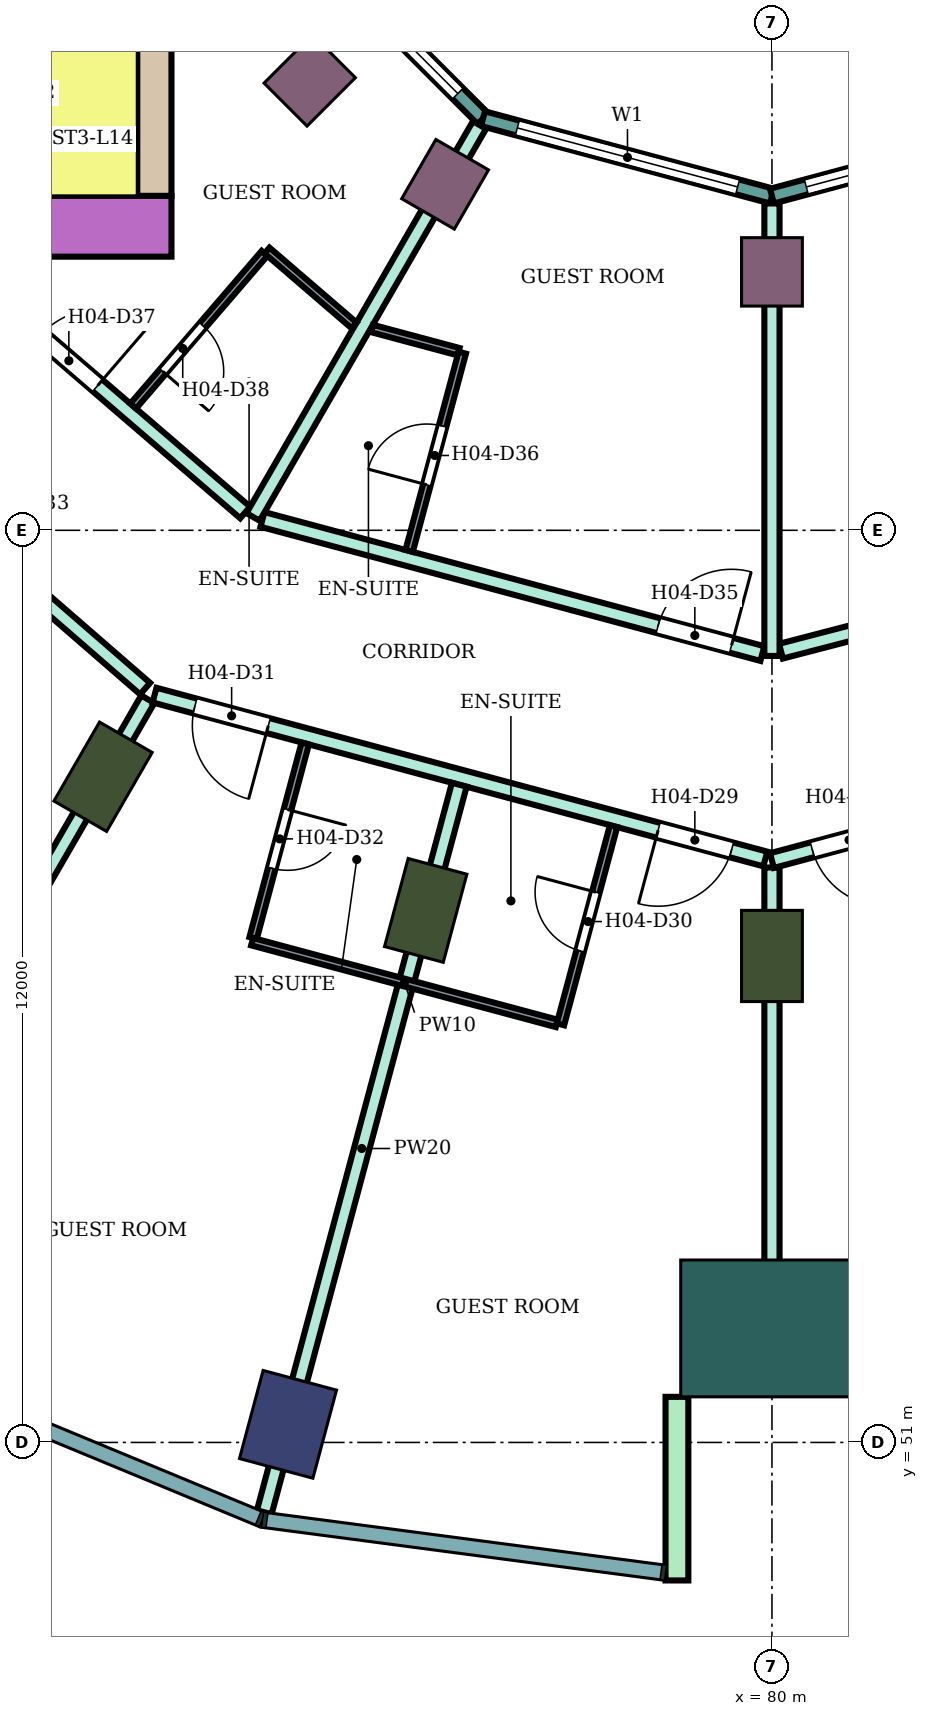
"""IFC4 building model, lengths in metres.
Left out: names, types, materials, properties, quantities, classifications, styles, units other than length and angle.
Written with IfcOpenShell. Run it as: python <this file> out.ifc"""

import sys

from ifc_helpers import new_model, si_unit, direction, frame, frame_2d, origin, origin_2d, place, context, subcontext, project, spatial, rectangle, extrude, element, fill, save


model = new_model("IFC4")
c1 = context("Model", 3, precision=1e-05, world=origin(), true_north=direction((0.0, 1.0)))
c2 = subcontext(c1, "Body", "Model", "MODEL_VIEW")
j1 = project(units=[si_unit("LENGTHUNIT", "METRE"), si_unit("PLANEANGLEUNIT", "RADIAN")], contexts=[c1])
p1 = place(None, origin())
s1 = spatial("IfcSite", under=j1, at=p1, CompositionType="ELEMENT")
p2 = place(p1, origin())
s2 = spatial("IfcBuilding", under=s1, at=p2, CompositionType="ELEMENT")
p3 = place(p2, frame((0.0, 0.0, 63.0)))
s3 = spatial("IfcBuildingStorey", under=s2, at=p3, CompositionType="ELEMENT", Elevation=63.0)
p4 = place(p3, frame((73.633, 51.238, 0.0), z_axis=(0.0, 0.0, 1.0), x_axis=(-0.258819045103, -0.965925826289, 0.0)))
e1 = element("IfcColumn", 1, at=p4, inside=s3, PredefinedType="COLUMN", context=c2, shape_type="SweptSolid", body=[
    extrude(rectangle(XDim=1.2, YDim=1.0, at=origin_2d()), origin(), (0.0, 0.0, 1.0), 3.8),
])
for number, where, z_axis, x_axis in (
    (2, (71.2, 59.758, 0.0), (0.0, 0.0, 1.0), (-0.5, -0.866, 0.0)),
    (3, (75.445, 58.0, 0.0), (0.0, 0.0, 1.0), (-0.259, -0.966, 0.0)),
    (4, (80.0, 57.4, 0.0), (0.0, 0.0, 1.0), (0.0, -1.0, 0.0)),
):
    element("IfcColumn", number, at=place(p3, frame(where, z_axis=z_axis, x_axis=x_axis)), inside=s3, PredefinedType="COLUMN", context=c2, shape_type="SweptSolid", body=[
        extrude(rectangle(XDim=1.2, YDim=0.8, at=origin_2d()), origin(), (0.0, 0.0, 1.0), 3.8),
    ])
for number, where, z_axis, x_axis in (
    (5, (73.919, 68.919, 0.0), (0.0, 0.0, 1.0), (-0.707, -0.707, 0.0)),
    (6, (75.7, 67.552, 0.0), (0.0, 0.0, 1.0), (-0.5, -0.866, 0.0)),
    (7, (80.0, 66.4, 0.0), (0.0, 0.0, 1.0), (0.0, -1.0, 0.0)),
):
    element("IfcColumn", number, at=place(p3, frame(where, z_axis=z_axis, x_axis=x_axis)), inside=s3, PredefinedType="COLUMN", context=c2, shape_type="SweptSolid", body=[
        extrude(rectangle(XDim=0.9, YDim=0.8, at=origin_2d()), origin(), (0.0, 0.0, 1.0), 3.8),
    ])
p5 = place(p3, frame((80.0, 52.5, 0.0), z_axis=(0.0, 0.0, 1.0), x_axis=(0.0, -1.0, 0.0)))
e8 = element("IfcColumn", 8, at=p5, inside=s3, PredefinedType="COLUMN", context=c2, shape_type="SweptSolid", body=[
    extrude(rectangle(XDim=1.8, YDim=2.4, at=origin_2d()), origin(), (0.0, 0.0, 1.0), 3.8),
])
p6 = place(p3, frame((72.1, 67.0, 0.0), z_axis=(0.0, 0.0, 1.0), x_axis=(-1.0, 0.0, 0.0)))
e9 = element("IfcWall", 9, at=p6, inside=s3, PredefinedType="SHEAR", context=c2, shape_type="SweptSolid", body=[
    extrude(rectangle(XDim=14.7, YDim=0.8, at=frame_2d((7.35, 0.0))), origin(), (0.0, 0.0, 1.0), 3.48),
])
p7 = place(p6, frame((4.2, 0.0, 0.0)))
e10 = element("IfcOpeningElement", 10, at=p7, cuts=e9, PredefinedType="OPENING", context=c2, shape_type="SweptSolid", body=[
    extrude(rectangle(XDim=2.4, YDim=2.4, at=frame_2d((1.2, 1.2))), frame((0.0, 0.41, 0.0), z_axis=(0.0, -1.0, 0.0), x_axis=(1.0, 0.0, 0.0)), (0.0, 0.0, 1.0), 0.82),
])
p8 = place(p3, frame((71.875, 75.0, 0.0), z_axis=(0.0, 0.0, 1.0), x_axis=(0.0, -1.0, 0.0)))
e11 = element("IfcWall", 11, at=p8, inside=s3, PredefinedType="SHEAR", context=c2, shape_type="SweptSolid", body=[
    extrude(rectangle(XDim=7.6, YDim=0.45, at=frame_2d((3.8, 0.0))), origin(), (0.0, 0.0, 1.0), 3.48),
])
p9 = place(p3, frame((78.75, 51.6, 0.0), z_axis=(0.0, 0.0, 1.0), x_axis=(0.0, -1.0, 0.0)))
e12 = element("IfcWall", 12, at=p9, inside=s3, PredefinedType="NOTDEFINED", context=c2, shape_type="SweptSolid", body=[
    extrude(rectangle(XDim=2.416, YDim=0.3, at=frame_2d((1.208, 0.0))), origin(), (0.0, 0.0, 1.0), 3.8),
])
p10 = place(p3, frame((73.415, 71.198, 0.0), z_axis=(0.0, 0.0, 1.0), x_axis=(0.707106781187, -0.707106781187, 0.0)))
e13 = element("IfcWall", 13, at=p10, inside=s3, PredefinedType="NOTDEFINED", context=c2, shape_type="SweptSolid", body=[
    extrude(rectangle(XDim=3.936, YDim=0.2, at=frame_2d((1.968, 0.0))), origin(), (0.0, 0.0, 1.0), 3.8),
])
p11 = place(p10, frame((0.468, 0.0, 0.9)))
e14 = element("IfcOpeningElement", 14, at=p11, cuts=e13, PredefinedType="OPENING", context=c2, shape_type="SweptSolid", body=[
    extrude(rectangle(XDim=3.0, YDim=2.3, at=frame_2d((1.5, 1.15))), frame((0.0, 0.11, 0.0), z_axis=(0.0, -1.0, 0.0), x_axis=(1.0, 0.0, 0.0)), (0.0, 0.0, 1.0), 0.22),
])
p12 = place(p3, frame((76.198, 68.415, 0.0), z_axis=(0.0, 0.0, 1.0), x_axis=(0.965933654434, -0.258789828301, 0.0)))
e15 = element("IfcWall", 15, at=p12, inside=s3, PredefinedType="NOTDEFINED", context=c2, shape_type="SweptSolid", body=[
    extrude(rectangle(XDim=3.936, YDim=0.2, at=frame_2d((1.968, 0.0))), origin(), (0.0, 0.0, 1.0), 3.8),
])
p13 = place(p12, frame((0.468, 0.0, 0.9)))
e16 = element("IfcOpeningElement", 16, at=p13, cuts=e15, PredefinedType="OPENING", context=c2, shape_type="SweptSolid", body=[
    extrude(rectangle(XDim=3.0, YDim=2.3, at=frame_2d((1.5, 1.15))), frame((0.0, 0.11, 0.0), z_axis=(0.0, -1.0, 0.0), x_axis=(1.0, 0.0, 0.0)), (0.0, 0.0, 1.0), 0.22),
])
p14 = place(p3, frame((80.0, 67.396, 0.0), z_axis=(0.0, 0.0, 1.0), x_axis=(0.965933654434, 0.258789828301, 0.0)))
e17 = element("IfcWall", 17, at=p14, inside=s3, PredefinedType="NOTDEFINED", context=c2, shape_type="SweptSolid", body=[
    extrude(rectangle(XDim=3.936, YDim=0.2, at=frame_2d((1.968, 0.0))), origin(), (0.0, 0.0, 1.0), 3.8),
])
p15 = place(p14, frame((0.468, 0.0, 0.9)))
e18 = element("IfcOpeningElement", 18, at=p15, cuts=e17, PredefinedType="OPENING", context=c2, shape_type="SweptSolid", body=[
    extrude(rectangle(XDim=3.0, YDim=2.3, at=frame_2d((1.5, 1.15))), frame((0.0, 0.11, 0.0), z_axis=(0.0, -1.0, 0.0), x_axis=(1.0, 0.0, 0.0)), (0.0, 0.0, 1.0), 0.22),
])
p16 = place(p3, frame((66.924, 65.111, 0.0), z_axis=(0.0, 0.0, 1.0), x_axis=(0.755023669255, -0.655697536113, 0.0)))
e19 = element("IfcWall", 19, at=p16, inside=s3, PredefinedType="PARTITIONING", context=c2, shape_type="SweptSolid", body=[
    extrude(rectangle(XDim=6.396, YDim=0.2, at=frame_2d((3.198, 0.0))), origin(), (0.0, 0.0, 1.0), 3.35),
])
p17 = place(p16, frame((2.658, 0.0, 0.0)))
e20 = element("IfcOpeningElement", 20, at=p17, cuts=e19, PredefinedType="OPENING", context=c2, shape_type="SweptSolid", body=[
    extrude(rectangle(XDim=1.8, YDim=2.1, at=frame_2d((0.9, 1.05))), frame((0.0, 0.11, 0.0), z_axis=(0.0, -1.0, 0.0), x_axis=(1.0, 0.0, 0.0)), (0.0, 0.0, 1.0), 0.22),
])
p18 = place(p3, frame((67.099, 52.661, 0.0), z_axis=(0.0, 0.0, 1.0), x_axis=(0.500234203776, 0.86589014394, 0.0)))
e21 = element("IfcWall", 21, at=p18, inside=s3, PredefinedType="PARTITIONING", context=c2, shape_type="SweptSolid", body=[
    extrude(rectangle(XDim=9.374, YDim=0.2, at=frame_2d((4.687, 0.0))), origin(), (0.0, 0.0, 1.0), 3.35),
])
p19 = place(p3, frame((69.158, 66.6, 0.0), z_axis=(0.0, 0.0, 1.0), x_axis=(0.757976058094, -0.652282373943, 0.0)))
e22 = element("IfcWall", 22, at=p19, inside=s3, PredefinedType="PARTITIONING", context=c2, shape_type="SweptSolid", body=[
    extrude(rectangle(XDim=5.16, YDim=0.2, at=frame_2d((2.58, 0.0))), origin(), (0.0, 0.0, 1.0), 3.35),
])
p20 = place(p19, frame((1.6, 0.0, 0.0)))
e23 = element("IfcOpeningElement", 23, at=p20, cuts=e22, PredefinedType="OPENING", context=c2, shape_type="SweptSolid", body=[
    extrude(rectangle(XDim=1.0, YDim=2.1, at=frame_2d((0.5, 1.05))), frame((0.0, 0.11, 0.0), z_axis=(0.0, -1.0, 0.0), x_axis=(1.0, 0.0, 0.0)), (0.0, 0.0, 1.0), 0.22),
])
p21 = place(p3, frame((71.877, 60.832, 0.0), z_axis=(0.0, 0.0, 1.0), x_axis=(0.965852509869, -0.259092510851, 0.0)))
e24 = element("IfcWall", 24, at=p21, inside=s3, PredefinedType="PARTITIONING", context=c2, shape_type="SweptSolid", body=[
    extrude(rectangle(XDim=8.32, YDim=0.2, at=frame_2d((4.16, 0.0))), origin(), (0.0, 0.0, 1.0), 3.35),
])
p22 = place(p21, frame((6.86, 0.0, 0.0)))
e25 = element("IfcOpeningElement", 25, at=p22, cuts=e24, PredefinedType="OPENING", context=c2, shape_type="SweptSolid", body=[
    extrude(rectangle(XDim=1.0, YDim=2.1, at=frame_2d((0.5, 1.05))), frame((0.0, 0.11, 0.0), z_axis=(0.0, -1.0, 0.0), x_axis=(1.0, 0.0, 0.0)), (0.0, 0.0, 1.0), 0.22),
])
p23 = place(p21, frame((0.55, 0.0, 0.0)))
e26 = element("IfcOpeningElement", 26, at=p23, cuts=e24, PredefinedType="OPENING", context=c2, shape_type="SweptSolid", body=[
    extrude(rectangle(XDim=1.0, YDim=2.1, at=frame_2d((0.5, 1.05))), frame((0.0, 0.11, 0.0), z_axis=(0.0, -1.0, 0.0), x_axis=(1.0, 0.0, 0.0)), (0.0, 0.0, 1.0), 0.22),
])
p24 = place(p3, frame((73.297, 63.143, 0.0), z_axis=(0.0, 0.0, 1.0), x_axis=(0.965859030528, -0.25906820173, 0.0)))
e27 = element("IfcWall", 27, at=p24, inside=s3, PredefinedType="PARTITIONING", context=c2, shape_type="SweptSolid", body=[
    extrude(rectangle(XDim=6.81, YDim=0.2, at=frame_2d((3.405, 0.0))), origin(), (0.0, 0.0, 1.0), 3.35),
])
p25 = place(p24, frame((5.39, 0.0, 0.0)))
e28 = element("IfcOpeningElement", 28, at=p25, cuts=e27, PredefinedType="OPENING", context=c2, shape_type="SweptSolid", body=[
    extrude(rectangle(XDim=1.0, YDim=2.1, at=frame_2d((0.5, 1.05))), frame((0.0, 0.11, 0.0), z_axis=(0.0, -1.0, 0.0), x_axis=(1.0, 0.0, 0.0)), (0.0, 0.0, 1.0), 0.22),
])
p26 = place(p3, frame((73.174, 63.176, 0.0), z_axis=(0.0, 0.0, 1.0), x_axis=(0.500257106344, 0.865876912472, 0.0)))
e29 = element("IfcWall", 29, at=p26, inside=s3, PredefinedType="PARTITIONING", context=c2, shape_type="SweptSolid", body=[
    extrude(rectangle(XDim=5.955, YDim=0.2, at=frame_2d((2.978, 0.0))), origin(), (0.0, 0.0, 1.0), 3.35),
])
p27 = place(p3, frame((73.321, 50.081, 0.0), z_axis=(0.0, 0.0, 1.0), x_axis=(0.258889198551, 0.965907025999, 0.0)))
e30 = element("IfcWall", 30, at=p27, inside=s3, PredefinedType="PARTITIONING", context=c2, shape_type="SweptSolid", body=[
    extrude(rectangle(XDim=9.909, YDim=0.2, at=frame_2d((4.955, 0.0))), origin(), (0.0, 0.0, 1.0), 3.35),
])
p28 = place(p3, frame((80.119, 61.41, 0.0), z_axis=(0.0, 0.0, 1.0), x_axis=(0.967823361235, 0.251630565408, 0.0)))
e31 = element("IfcWall", 31, at=p28, inside=s3, PredefinedType="PARTITIONING", context=c2, shape_type="SweptSolid", body=[
    extrude(rectangle(XDim=6.958, YDim=0.2, at=frame_2d((3.479, 0.0))), origin(), (0.0, 0.0, 1.0), 3.35),
])
p29 = place(p28, frame((2.529, 0.0, 0.0)))
e32 = element("IfcOpeningElement", 32, at=p29, cuts=e31, PredefinedType="OPENING", context=c2, shape_type="SweptSolid", body=[
    extrude(rectangle(XDim=1.8, YDim=2.1, at=frame_2d((0.9, 1.05))), frame((0.0, 0.11, 0.0), z_axis=(0.0, -1.0, 0.0), x_axis=(1.0, 0.0, 0.0)), (0.0, 0.0, 1.0), 0.22),
])
p30 = place(p3, frame((80.0, 51.8, 0.0), z_axis=(0.0, 0.0, 1.0), x_axis=(0.0, 1.0, 0.0)))
e33 = element("IfcWall", 33, at=p30, inside=s3, PredefinedType="PARTITIONING", context=c2, shape_type="SweptSolid", body=[
    extrude(rectangle(XDim=6.764, YDim=0.2, at=frame_2d((3.382, 0.0))), origin(), (0.0, 0.0, 1.0), 3.35),
])
p31 = place(p3, frame((80.0, 58.655, 0.0), z_axis=(0.0, 0.0, 1.0), x_axis=(0.965974635626, 0.258636817424, 0.0)))
e34 = element("IfcWall", 34, at=p31, inside=s3, PredefinedType="PARTITIONING", context=c2, shape_type="SweptSolid", body=[
    extrude(rectangle(XDim=8.36, YDim=0.2, at=frame_2d((4.18, 0.0))), origin(), (0.0, 0.0, 1.0), 3.35),
])
p32 = place(p31, frame((6.86, 0.0, 0.0)))
e35 = element("IfcOpeningElement", 35, at=p32, cuts=e34, PredefinedType="OPENING", context=c2, shape_type="SweptSolid", body=[
    extrude(rectangle(XDim=1.0, YDim=2.1, at=frame_2d((0.5, 1.05))), frame((0.0, 0.11, 0.0), z_axis=(0.0, -1.0, 0.0), x_axis=(1.0, 0.0, 0.0)), (0.0, 0.0, 1.0), 0.22),
])
p33 = place(p31, frame((0.55, 0.0, 0.0)))
e36 = element("IfcOpeningElement", 36, at=p33, cuts=e34, PredefinedType="OPENING", context=c2, shape_type="SweptSolid", body=[
    extrude(rectangle(XDim=1.0, YDim=2.1, at=frame_2d((0.5, 1.05))), frame((0.0, 0.11, 0.0), z_axis=(0.0, -1.0, 0.0), x_axis=(1.0, 0.0, 0.0)), (0.0, 0.0, 1.0), 0.22),
])
p34 = place(p3, frame((80.0, 61.347, 0.0), z_axis=(0.0, 0.0, 1.0), x_axis=(0.0, 1.0, 0.0)))
e37 = element("IfcWall", 37, at=p34, inside=s3, PredefinedType="PARTITIONING", context=c2, shape_type="SweptSolid", body=[
    extrude(rectangle(XDim=5.953, YDim=0.2, at=frame_2d((2.977, 0.0))), origin(), (0.0, 0.0, 1.0), 3.35),
])
p35 = place(p3, frame((71.596, 64.635, 0.0), z_axis=(0.0, 0.0, 1.0), x_axis=(0.652285007511, 0.757973791748, 0.0)))
e38 = element("IfcWall", 38, at=p35, inside=s3, PredefinedType="PARTITIONING", context=c2, shape_type="SweptSolid", body=[
    extrude(rectangle(XDim=2.65, YDim=0.1, at=frame_2d((1.325, 0.0))), origin(), (0.0, 0.0, 1.0), 3.35),
])
p36 = place(p35, frame((0.6, 0.0, 0.0)))
e39 = element("IfcOpeningElement", 39, at=p36, cuts=e38, PredefinedType="OPENING", context=c2, shape_type="SweptSolid", body=[
    extrude(rectangle(XDim=0.8, YDim=2.1, at=frame_2d((0.4, 1.05))), frame((0.0, 0.06, 0.0), z_axis=(0.0, -1.0, 0.0), x_axis=(1.0, 0.0, 0.0)), (0.0, 0.0, 1.0), 0.12),
])
p37 = place(p3, frame((73.174, 57.636, 0.0), z_axis=(0.0, 0.0, 1.0), x_axis=(0.258952498977, 0.96589005755, 0.0)))
e40 = element("IfcWall", 40, at=p37, inside=s3, PredefinedType="PARTITIONING", context=c2, shape_type="SweptSolid", body=[
    extrude(rectangle(XDim=2.65, YDim=0.1, at=frame_2d((1.325, 0.0))), origin(), (0.0, 0.0, 1.0), 3.35),
])
p38 = place(p37, frame((0.95, 0.0, 0.0)))
e41 = element("IfcOpeningElement", 41, at=p38, cuts=e40, PredefinedType="OPENING", context=c2, shape_type="SweptSolid", body=[
    extrude(rectangle(XDim=0.8, YDim=2.1, at=frame_2d((0.4, 1.05))), frame((0.0, 0.06, 0.0), z_axis=(0.0, -1.0, 0.0), x_axis=(1.0, 0.0, 0.0)), (0.0, 0.0, 1.0), 0.12),
])
p39 = place(p3, frame((73.161, 57.588, 0.0), z_axis=(0.0, 0.0, 1.0), x_axis=(0.965858994467, -0.259068336173, 0.0)))
e42 = element("IfcWall", 42, at=p39, inside=s3, PredefinedType="PARTITIONING", context=c2, shape_type="SweptSolid", body=[
    extrude(rectangle(XDim=4.15, YDim=0.1, at=frame_2d((2.075, 0.0))), origin(), (0.0, 0.0, 1.0), 3.35),
])
p40 = place(p3, frame((73.357, 66.681, 0.0), z_axis=(0.0, 0.0, 1.0), x_axis=(0.758263469747, -0.651948242154, 0.0)))
e43 = element("IfcWall", 43, at=p40, inside=s3, PredefinedType="PARTITIONING", context=c2, shape_type="SweptSolid", body=[
    extrude(rectangle(XDim=1.511, YDim=0.1, at=frame_2d((0.755, 0.0))), origin(), (0.0, 0.0, 1.0), 3.35),
])
p41 = place(p3, frame((74.739, 65.655, 0.0), z_axis=(0.0, 0.0, 1.0), x_axis=(0.96591107063, -0.258874107695, 0.0)))
e44 = element("IfcWall", 44, at=p41, inside=s3, PredefinedType="PARTITIONING", context=c2, shape_type="SweptSolid", body=[
    extrude(rectangle(XDim=1.179, YDim=0.1, at=frame_2d((0.589, 0.0))), origin(), (0.0, 0.0, 1.0), 3.35),
])
p42 = place(p3, frame((75.227, 62.729, 0.0), z_axis=(0.0, 0.0, 1.0), x_axis=(0.258945475746, 0.965891940432, 0.0)))
e45 = element("IfcWall", 45, at=p42, inside=s3, PredefinedType="PARTITIONING", context=c2, shape_type="SweptSolid", body=[
    extrude(rectangle(XDim=2.7, YDim=0.1, at=frame_2d((1.35, 0.0))), origin(), (0.0, 0.0, 1.0), 3.35),
])
p43 = place(p42, frame((0.9, 0.0, 0.0)))
e46 = element("IfcOpeningElement", 46, at=p43, cuts=e45, PredefinedType="OPENING", context=c2, shape_type="SweptSolid", body=[
    extrude(rectangle(XDim=0.8, YDim=2.1, at=frame_2d((0.4, 1.05))), frame((0.0, 0.06, 0.0), z_axis=(0.0, -1.0, 0.0), x_axis=(1.0, 0.0, 0.0)), (0.0, 0.0, 1.0), 0.12),
])
p44 = place(p3, frame((77.218, 56.501, 0.0), z_axis=(0.0, 0.0, 1.0), x_axis=(0.258591408257, 0.965986792651, 0.0)))
e47 = element("IfcWall", 47, at=p44, inside=s3, PredefinedType="PARTITIONING", context=c2, shape_type="SweptSolid", body=[
    extrude(rectangle(XDim=2.699, YDim=0.1, at=frame_2d((1.35, 0.0))), origin(), (0.0, 0.0, 1.0), 3.35),
])
p45 = place(p44, frame((1.0, 0.0, 0.0)))
e48 = element("IfcOpeningElement", 48, at=p45, cuts=e47, PredefinedType="OPENING", context=c2, shape_type="SweptSolid", body=[
    extrude(rectangle(XDim=0.8, YDim=2.1, at=frame_2d((0.4, 1.05))), frame((0.0, 0.06, 0.0), z_axis=(0.0, -1.0, 0.0), x_axis=(1.0, 0.0, 0.0)), (0.0, 0.0, 1.0), 0.12),
])
p46 = place(p11, origin())
e49 = element("IfcWindow", 49, at=p46, inside=s3, PartitioningType="SINGLE_PANEL", PredefinedType="WINDOW", context=c2, shape_type="SweptSolid", body=[
    extrude(rectangle(XDim=3.0, YDim=2.3, at=frame_2d((1.5, 1.15))), frame((0.0, 0.03, 0.0), z_axis=(0.0, -1.0, 0.0), x_axis=(1.0, 0.0, 0.0)), (0.0, 0.0, 1.0), 0.06),
])
fill(e14, e49)
p47 = place(p13, origin())
e50 = element("IfcWindow", 50, at=p47, inside=s3, PartitioningType="SINGLE_PANEL", PredefinedType="WINDOW", context=c2, shape_type="SweptSolid", body=[
    extrude(rectangle(XDim=3.0, YDim=2.3, at=frame_2d((1.5, 1.15))), frame((0.0, 0.03, 0.0), z_axis=(0.0, -1.0, 0.0), x_axis=(1.0, 0.0, 0.0)), (0.0, 0.0, 1.0), 0.06),
])
fill(e16, e50)
p48 = place(p15, origin())
e51 = element("IfcWindow", 51, at=p48, inside=s3, PartitioningType="SINGLE_PANEL", PredefinedType="WINDOW", context=c2, shape_type="SweptSolid", body=[
    extrude(rectangle(XDim=3.0, YDim=2.3, at=frame_2d((1.5, 1.15))), frame((0.0, 0.03, 0.0), z_axis=(0.0, -1.0, 0.0), x_axis=(1.0, 0.0, 0.0)), (0.0, 0.0, 1.0), 0.06),
])
fill(e18, e51)
p49 = place(p33, frame((1.0, 0.0, 0.0), z_axis=(0.0, 0.0, 1.0), x_axis=(-1.0, 0.0, 0.0)))
e52 = element("IfcDoor", 52, at=p49, inside=s3, OperationType="SINGLE_SWING_LEFT", PredefinedType="DOOR", context=c2, shape_type="SweptSolid", body=[
    extrude(rectangle(XDim=1.0, YDim=2.1, at=frame_2d((0.5, 1.05))), frame((0.0, 0.025, 0.0), z_axis=(0.0, -1.0, 0.0), x_axis=(1.0, 0.0, 0.0)), (0.0, 0.0, 1.0), 0.05),
])
fill(e36, e52)
p50 = place(p22, frame((1.0, 0.0, 0.0), z_axis=(0.0, 0.0, 1.0), x_axis=(-1.0, 0.0, 0.0)))
e53 = element("IfcDoor", 53, at=p50, inside=s3, OperationType="SINGLE_SWING_RIGHT", PredefinedType="DOOR", context=c2, shape_type="SweptSolid", body=[
    extrude(rectangle(XDim=1.0, YDim=2.1, at=frame_2d((0.5, 1.05))), frame((0.0, 0.025, 0.0), z_axis=(0.0, -1.0, 0.0), x_axis=(1.0, 0.0, 0.0)), (0.0, 0.0, 1.0), 0.05),
])
fill(e25, e53)
p51 = place(p45, origin())
e54 = element("IfcDoor", 54, at=p51, inside=s3, OperationType="SINGLE_SWING_RIGHT", PredefinedType="DOOR", context=c2, shape_type="SweptSolid", body=[
    extrude(rectangle(XDim=0.8, YDim=2.1, at=frame_2d((0.4, 1.05))), frame((0.0, 0.025, 0.0), z_axis=(0.0, -1.0, 0.0), x_axis=(1.0, 0.0, 0.0)), (0.0, 0.0, 1.0), 0.05),
])
fill(e48, e54)
p52 = place(p23, frame((1.0, 0.0, 0.0), z_axis=(0.0, 0.0, 1.0), x_axis=(-1.0, 0.0, 0.0)))
e55 = element("IfcDoor", 55, at=p52, inside=s3, OperationType="SINGLE_SWING_LEFT", PredefinedType="DOOR", context=c2, shape_type="SweptSolid", body=[
    extrude(rectangle(XDim=1.0, YDim=2.1, at=frame_2d((0.5, 1.05))), frame((0.0, 0.025, 0.0), z_axis=(0.0, -1.0, 0.0), x_axis=(1.0, 0.0, 0.0)), (0.0, 0.0, 1.0), 0.05),
])
fill(e26, e55)
p53 = place(p38, frame((0.8, 0.0, 0.0), z_axis=(0.0, 0.0, 1.0), x_axis=(-1.0, 0.0, 0.0)))
e56 = element("IfcDoor", 56, at=p53, inside=s3, OperationType="SINGLE_SWING_LEFT", PredefinedType="DOOR", context=c2, shape_type="SweptSolid", body=[
    extrude(rectangle(XDim=0.8, YDim=2.1, at=frame_2d((0.4, 1.05))), frame((0.0, 0.025, 0.0), z_axis=(0.0, -1.0, 0.0), x_axis=(1.0, 0.0, 0.0)), (0.0, 0.0, 1.0), 0.05),
])
fill(e41, e56)
p54 = place(p25, origin())
e57 = element("IfcDoor", 57, at=p54, inside=s3, OperationType="SINGLE_SWING_RIGHT", PredefinedType="DOOR", context=c2, shape_type="SweptSolid", body=[
    extrude(rectangle(XDim=1.0, YDim=2.1, at=frame_2d((0.5, 1.05))), frame((0.0, 0.025, 0.0), z_axis=(0.0, -1.0, 0.0), x_axis=(1.0, 0.0, 0.0)), (0.0, 0.0, 1.0), 0.05),
])
fill(e28, e57)
p55 = place(p43, origin())
e58 = element("IfcDoor", 58, at=p55, inside=s3, OperationType="SINGLE_SWING_LEFT", PredefinedType="DOOR", context=c2, shape_type="SweptSolid", body=[
    extrude(rectangle(XDim=0.8, YDim=2.1, at=frame_2d((0.4, 1.05))), frame((0.0, 0.025, 0.0), z_axis=(0.0, -1.0, 0.0), x_axis=(1.0, 0.0, 0.0)), (0.0, 0.0, 1.0), 0.05),
])
fill(e46, e58)
p56 = place(p20, origin())
e59 = element("IfcDoor", 59, at=p56, inside=s3, OperationType="SINGLE_SWING_RIGHT", PredefinedType="DOOR", context=c2, shape_type="SweptSolid", body=[
    extrude(rectangle(XDim=1.0, YDim=2.1, at=frame_2d((0.5, 1.05))), frame((0.0, 0.025, 0.0), z_axis=(0.0, -1.0, 0.0), x_axis=(1.0, 0.0, 0.0)), (0.0, 0.0, 1.0), 0.05),
])
fill(e23, e59)
p57 = place(p36, frame((0.8, 0.0, 0.0), z_axis=(0.0, 0.0, 1.0), x_axis=(-1.0, 0.0, 0.0)))
e60 = element("IfcDoor", 60, at=p57, inside=s3, OperationType="SINGLE_SWING_RIGHT", PredefinedType="DOOR", context=c2, shape_type="SweptSolid", body=[
    extrude(rectangle(XDim=0.8, YDim=2.1, at=frame_2d((0.4, 1.05))), frame((0.0, 0.025, 0.0), z_axis=(0.0, -1.0, 0.0), x_axis=(1.0, 0.0, 0.0)), (0.0, 0.0, 1.0), 0.05),
])
fill(e39, e60)
save(model, sys.argv[1])
